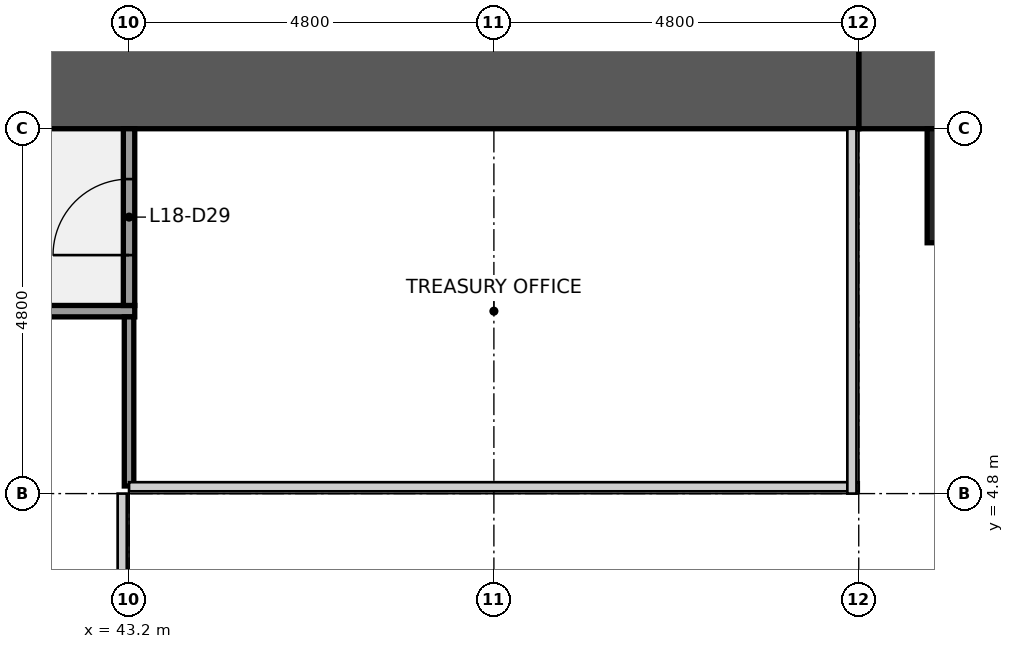
"""IFC4 building model, lengths in metres.
Left out: names, types, materials, properties, quantities, classifications, styles, units other than length and angle.
Written with IfcOpenShell. Run it as: python <this file> out.ifc"""

import sys

from ifc_helpers import new_model, si_unit, direction, frame, frame_2d, origin, origin_2d, place, context, subcontext, project, spatial, rectangle, extrude, element, fill, save


model = new_model("IFC4")
c1 = context("Model", 3, precision=1e-05, world=origin(), true_north=direction((0.0, 1.0)))
c2 = subcontext(c1, "Body", "Model", "MODEL_VIEW")
j1 = project(units=[si_unit("LENGTHUNIT", "METRE"), si_unit("PLANEANGLEUNIT", "RADIAN")], contexts=[c1])
p1 = place(None, origin())
s1 = spatial("IfcSite", under=j1, at=p1, CompositionType="ELEMENT")
p2 = place(p1, origin())
s2 = spatial("IfcBuilding", under=s1, at=p2, CompositionType="ELEMENT")
p3 = place(p2, frame((0.0, 0.0, 83.0)))
s3 = spatial("IfcBuildingStorey", under=s2, at=p3, CompositionType="ELEMENT", Elevation=83.0)
p4 = place(p3, frame((56.4, 10.2, 0.0), z_axis=(0.0, 0.0, 1.0), x_axis=(-1.0, 0.0, 0.0)))
e1 = element("IfcWall", 1, at=p4, inside=s3, PredefinedType="SHEAR", context=c2, shape_type="SweptSolid", body=[
    extrude(rectangle(XDim=3.6, YDim=1.2, at=frame_2d((1.8, 0.0))), origin(), (0.0, 0.0, 1.0), 3.7),
])
p5 = place(p3, frame((52.8, 10.2, 0.0), z_axis=(0.0, 0.0, 1.0), x_axis=(-1.0, 0.0, 0.0)))
e2 = element("IfcWall", 2, at=p5, inside=s3, PredefinedType="SHEAR", context=c2, shape_type="SweptSolid", body=[
    extrude(rectangle(XDim=13.2, YDim=1.2, at=frame_2d((6.6, 0.0))), origin(), (0.0, 0.0, 1.0), 3.7),
])
p6 = place(p5, frame((11.45, 0.0, 0.0)))
e3 = element("IfcOpeningElement", 3, at=p6, cuts=e2, PredefinedType="OPENING", context=c2, shape_type="SweptSolid", body=[
    extrude(rectangle(XDim=1.1, YDim=2.1, at=frame_2d((0.55, 1.05))), frame((0.0, 0.61, 0.0), z_axis=(0.0, -1.0, 0.0), x_axis=(1.0, 0.0, 0.0)), (0.0, 0.0, 1.0), 1.22),
])
p7 = place(p3, frame((38.325, 7.2, 0.0), z_axis=(0.0, 0.0, 1.0), x_axis=(1.0, 0.0, 0.0)))
e4 = element("IfcWall", 4, at=p7, inside=s3, PredefinedType="PARTITIONING", context=c2, shape_type="SweptSolid", body=[
    extrude(rectangle(XDim=4.95, YDim=0.15, at=frame_2d((2.475, 0.0))), origin(), (0.0, 0.0, 1.0), 2.709),
])
p8 = place(p7, frame((1.975, 0.0, 0.0)))
e5 = element("IfcOpeningElement", 5, at=p8, cuts=e4, PredefinedType="OPENING", context=c2, shape_type="SweptSolid", body=[
    extrude(rectangle(XDim=1.0, YDim=2.1, at=frame_2d((0.5, 1.05))), frame((0.0, 0.085, 0.0), z_axis=(0.0, -1.0, 0.0), x_axis=(1.0, 0.0, 0.0)), (0.0, 0.0, 1.0), 0.17),
])
p9 = place(p3, frame((43.2, 4.9, 0.0), z_axis=(0.0, 0.0, 1.0), x_axis=(0.0, 1.0, 0.0)))
e6 = element("IfcWall", 6, at=p9, inside=s3, PredefinedType="PARTITIONING", context=c2, shape_type="SweptSolid", body=[
    extrude(rectangle(XDim=2.225, YDim=0.125, at=frame_2d((1.113, 0.0))), origin(), (0.0, 0.0, 1.0), 2.709),
])
p10 = place(p3, frame((43.2, 7.275, 0.0), z_axis=(0.0, 0.0, 1.0), x_axis=(0.0, 1.0, 0.0)))
e7 = element("IfcWall", 7, at=p10, inside=s3, PredefinedType="PARTITIONING", context=c2, shape_type="SweptSolid", body=[
    extrude(rectangle(XDim=2.325, YDim=0.15, at=frame_2d((1.163, 0.0))), origin(), (0.0, 0.0, 1.0), 2.709),
])
p11 = place(p10, frame((0.663, 0.0, 0.0)))
e8 = element("IfcOpeningElement", 8, at=p11, cuts=e7, PredefinedType="OPENING", context=c2, shape_type="SweptSolid", body=[
    extrude(rectangle(XDim=1.0, YDim=2.1, at=frame_2d((0.5, 1.05))), frame((0.0, 0.085, 0.0), z_axis=(0.0, -1.0, 0.0), x_axis=(1.0, 0.0, 0.0)), (0.0, 0.0, 1.0), 0.17),
])
p12 = place(p3, frame((55.2, 8.85, 0.0), z_axis=(0.0, 0.0, 1.0), x_axis=(1.0, 0.0, 0.0)))
e9 = element("IfcColumn", 9, at=p12, inside=s3, PredefinedType="PILASTER", context=c2, shape_type="SweptSolid", body=[
    extrude(rectangle(XDim=3.0, YDim=1.5, at=origin_2d()), origin(), (0.0, 0.0, 1.0), 4.0),
])
p13 = place(p11, origin())
e10 = element("IfcDoor", 10, at=p13, inside=s3, OperationType="SINGLE_SWING_LEFT", PredefinedType="DOOR", context=c2, shape_type="SweptSolid", body=[
    extrude(rectangle(XDim=1.0, YDim=2.1, at=frame_2d((0.5, 1.05))), frame((0.0, 0.025, 0.0), z_axis=(0.0, -1.0, 0.0), x_axis=(1.0, 0.0, 0.0)), (0.0, 0.0, 1.0), 0.05),
])
fill(e8, e10)
save(model, sys.argv[1])
